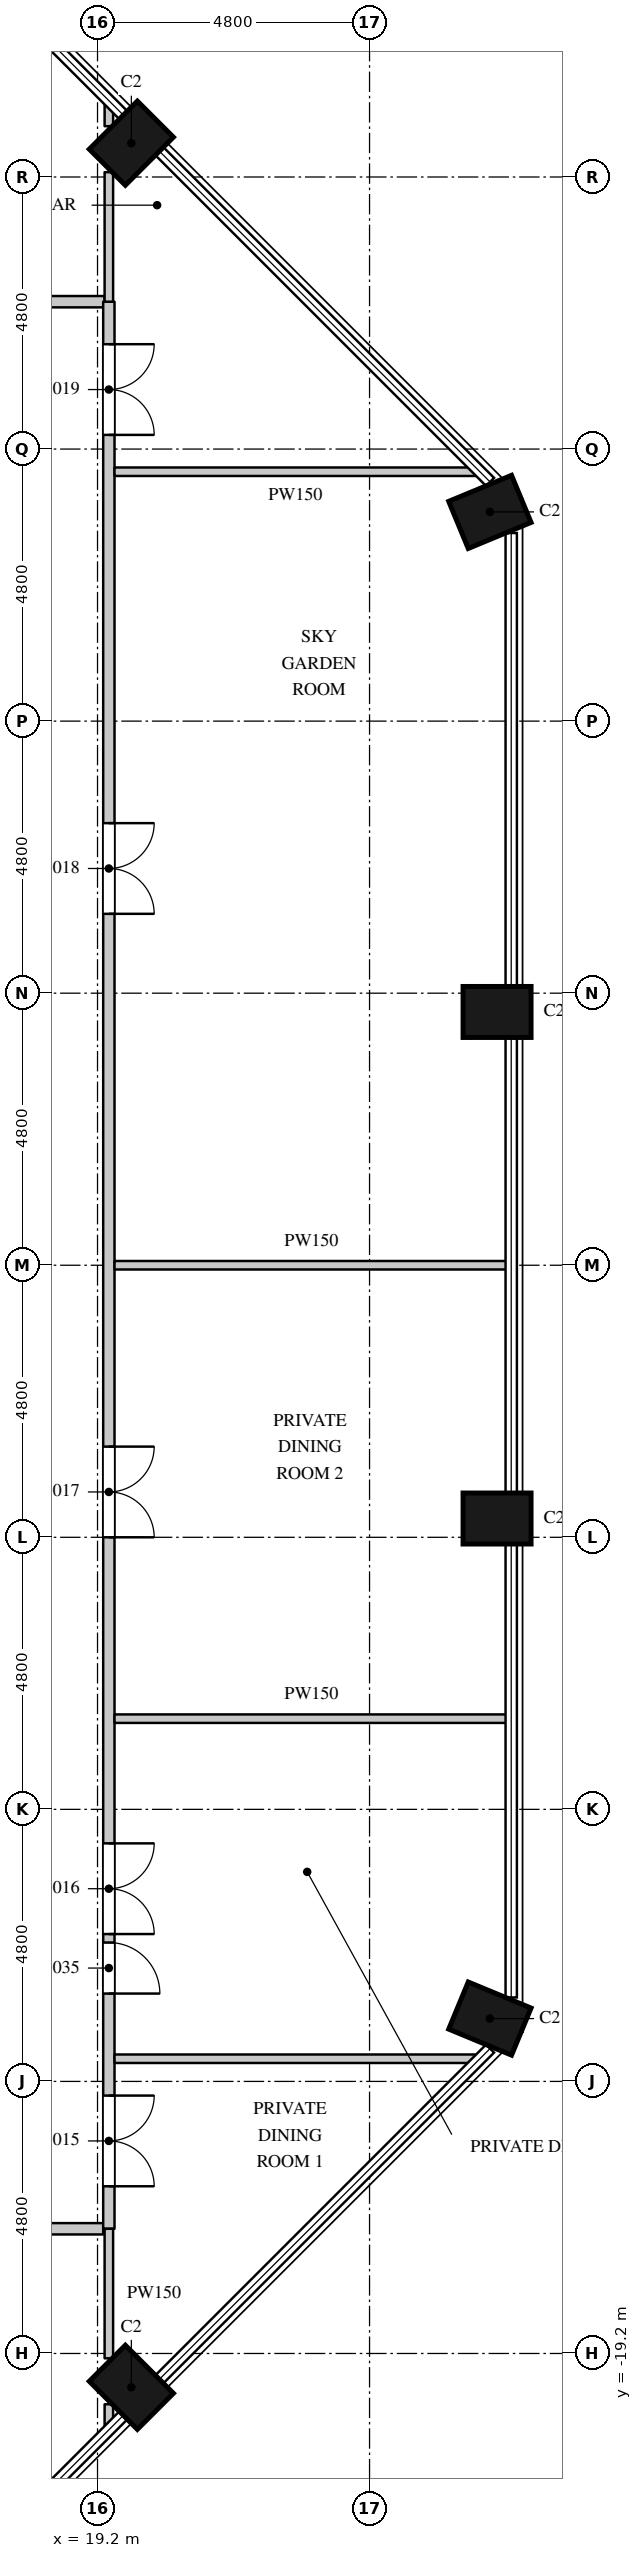
"""IFC4 building model, lengths in metres.
Left out: names, types, materials, properties, quantities, classifications, styles, units other than length and angle.
Written with IfcOpenShell. Run it as: python <this file> out.ifc"""

import sys

from ifc_helpers import new_model, si_unit, direction, frame, frame_2d, origin, origin_2d, place, context, subcontext, project, spatial, rectangle, extrude, element, fill, save


model = new_model("IFC4")
c1 = context("Model", 3, precision=1e-05, world=origin(), true_north=direction((0.0, 1.0)))
c2 = subcontext(c1, "Body", "Model", "MODEL_VIEW")
j1 = project(units=[si_unit("LENGTHUNIT", "METRE"), si_unit("PLANEANGLEUNIT", "RADIAN")], contexts=[c1])
p1 = place(None, origin())
s1 = spatial("IfcSite", under=j1, at=p1, CompositionType="ELEMENT")
p2 = place(p1, origin())
s2 = spatial("IfcBuilding", under=s1, at=p2, CompositionType="ELEMENT")
p3 = place(p2, frame((0.0, 0.0, 156.9)))
s3 = spatial("IfcBuildingStorey", under=s2, at=p3, CompositionType="ELEMENT", Elevation=156.9)
for number, where, z_axis, x_axis in (
    (1, (26.124, -13.291, 0.0), (0.0, 0.0, 1.0), (0.383, 0.924, 0.0)),
    (2, (26.25, -4.469, 0.0), (0.0, 0.0, 1.0), (0.0, 1.0, 0.0)),
    (3, (26.25, 4.469, 0.0), (0.0, 0.0, 1.0), (0.0, 1.0, 0.0)),
    (4, (26.124, 13.291, 0.0), (0.0, 0.0, 1.0), (-0.383, 0.924, 0.0)),
    (5, (19.797, 19.797, 0.0), (0.0, 0.0, 1.0), (-0.707, 0.707, 0.0)),
    (6, (19.797, -19.797, 0.0), (0.0, 0.0, 1.0), (0.707, 0.707, 0.0)),
):
    element("IfcColumn", number, at=place(p3, frame(where, z_axis=z_axis, x_axis=x_axis)), inside=s3, PredefinedType="COLUMN", context=c2, shape_type="SweptSolid", body=[
        extrude(rectangle(XDim=0.9, YDim=1.2, at=origin_2d()), origin(), (0.0, 0.0, 1.0), 5.4),
    ])
p4 = place(p3, frame((-19.3, -17.0, 0.0), z_axis=(0.0, 0.0, 1.0), x_axis=(1.0, 0.0, 0.0)))
e7 = element("IfcWall", 7, at=p4, inside=s3, PredefinedType="PARTITIONING", context=c2, shape_type="SweptSolid", body=[
    extrude(rectangle(XDim=38.6, YDim=0.2, at=frame_2d((19.3, 0.0))), origin(), (0.0, 0.0, 1.0), 5.1),
])
p5 = place(p4, frame((3.25, 0.0, 0.0)))
e8 = element("IfcOpeningElement", 8, at=p5, cuts=e7, PredefinedType="OPENING", context=c2, shape_type="SweptSolid", body=[
    extrude(rectangle(XDim=0.9, YDim=2.2, at=frame_2d((0.45, 1.1))), frame((0.0, 0.11, 0.0), z_axis=(0.0, -1.0, 0.0), x_axis=(1.0, 0.0, 0.0)), (0.0, 0.0, 1.0), 0.22),
])
p6 = place(p4, frame((9.8, 0.0, 0.0)))
e9 = element("IfcOpeningElement", 9, at=p6, cuts=e7, PredefinedType="OPENING", context=c2, shape_type="SweptSolid", body=[
    extrude(rectangle(XDim=0.9, YDim=2.2, at=frame_2d((0.45, 1.1))), frame((0.0, 0.11, 0.0), z_axis=(0.0, -1.0, 0.0), x_axis=(1.0, 0.0, 0.0)), (0.0, 0.0, 1.0), 0.22),
])
p7 = place(p4, frame((14.2, 0.0, 0.0)))
e10 = element("IfcOpeningElement", 10, at=p7, cuts=e7, PredefinedType="OPENING", context=c2, shape_type="SweptSolid", body=[
    extrude(rectangle(XDim=0.9, YDim=2.2, at=frame_2d((0.45, 1.1))), frame((0.0, 0.11, 0.0), z_axis=(0.0, -1.0, 0.0), x_axis=(1.0, 0.0, 0.0)), (0.0, 0.0, 1.0), 0.22),
])
p8 = place(p4, frame((18.9, 0.0, 0.0)))
e11 = element("IfcOpeningElement", 11, at=p8, cuts=e7, PredefinedType="OPENING", context=c2, shape_type="SweptSolid", body=[
    extrude(rectangle(XDim=1.6, YDim=2.4, at=frame_2d((0.8, 1.2))), frame((0.0, 0.11, 0.0), z_axis=(0.0, -1.0, 0.0), x_axis=(1.0, 0.0, 0.0)), (0.0, 0.0, 1.0), 0.22),
])
p9 = place(p4, frame((26.0, 0.0, 0.0)))
e12 = element("IfcOpeningElement", 12, at=p9, cuts=e7, PredefinedType="OPENING", context=c2, shape_type="SweptSolid", body=[
    extrude(rectangle(XDim=1.6, YDim=2.4, at=frame_2d((0.8, 1.2))), frame((0.0, 0.11, 0.0), z_axis=(0.0, -1.0, 0.0), x_axis=(1.0, 0.0, 0.0)), (0.0, 0.0, 1.0), 0.22),
])
p10 = place(p4, frame((33.6, 0.0, 0.0)))
e13 = element("IfcOpeningElement", 13, at=p10, cuts=e7, PredefinedType="OPENING", context=c2, shape_type="SweptSolid", body=[
    extrude(rectangle(XDim=1.6, YDim=2.4, at=frame_2d((0.8, 1.2))), frame((0.0, 0.11, 0.0), z_axis=(0.0, -1.0, 0.0), x_axis=(1.0, 0.0, 0.0)), (0.0, 0.0, 1.0), 0.22),
])
p11 = place(p4, frame((24.95, 0.0, 0.0)))
e14 = element("IfcOpeningElement", 14, at=p11, cuts=e7, PredefinedType="OPENING", context=c2, shape_type="SweptSolid", body=[
    extrude(rectangle(XDim=0.9, YDim=2.2, at=frame_2d((0.45, 1.1))), frame((0.0, 0.11, 0.0), z_axis=(0.0, -1.0, 0.0), x_axis=(1.0, 0.0, 0.0)), (0.0, 0.0, 1.0), 0.22),
])
p12 = place(p3, frame((-19.3, 17.0, 0.0), z_axis=(0.0, 0.0, 1.0), x_axis=(1.0, 0.0, 0.0)))
e15 = element("IfcWall", 15, at=p12, inside=s3, PredefinedType="PARTITIONING", context=c2, shape_type="SweptSolid", body=[
    extrude(rectangle(XDim=38.625, YDim=0.2, at=frame_2d((19.312, 0.0))), origin(), (0.0, 0.0, 1.0), 5.1),
])
p13 = place(p12, frame((4.9, 0.0, 0.0)))
e16 = element("IfcOpeningElement", 16, at=p13, cuts=e15, PredefinedType="OPENING", context=c2, shape_type="SweptSolid", body=[
    extrude(rectangle(XDim=1.6, YDim=2.4, at=frame_2d((0.8, 1.2))), frame((0.0, 0.11, 0.0), z_axis=(0.0, -1.0, 0.0), x_axis=(1.0, 0.0, 0.0)), (0.0, 0.0, 1.0), 0.22),
])
p14 = place(p12, frame((34.1, 0.0, 0.0)))
e17 = element("IfcOpeningElement", 17, at=p14, cuts=e15, PredefinedType="OPENING", context=c2, shape_type="SweptSolid", body=[
    extrude(rectangle(XDim=1.6, YDim=2.4, at=frame_2d((0.8, 1.2))), frame((0.0, 0.11, 0.0), z_axis=(0.0, -1.0, 0.0), x_axis=(1.0, 0.0, 0.0)), (0.0, 0.0, 1.0), 0.22),
])
p15 = place(p12, frame((20.5, 0.0, 0.0)))
e18 = element("IfcOpeningElement", 18, at=p15, cuts=e15, PredefinedType="OPENING", context=c2, shape_type="SweptSolid", body=[
    extrude(rectangle(XDim=1.6, YDim=2.4, at=frame_2d((0.8, 1.2))), frame((0.0, 0.11, 0.0), z_axis=(0.0, -1.0, 0.0), x_axis=(1.0, 0.0, 0.0)), (0.0, 0.0, 1.0), 0.22),
])
p16 = place(p12, frame((32.35, 0.0, 0.0)))
e19 = element("IfcOpeningElement", 19, at=p16, cuts=e15, PredefinedType="OPENING", context=c2, shape_type="SweptSolid", body=[
    extrude(rectangle(XDim=1.6, YDim=2.4, at=frame_2d((0.8, 1.2))), frame((0.0, 0.11, 0.0), z_axis=(0.0, -1.0, 0.0), x_axis=(1.0, 0.0, 0.0)), (0.0, 0.0, 1.0), 0.22),
])
p17 = place(p3, frame((19.4, -17.0, 0.0), z_axis=(0.0, 0.0, 1.0), x_axis=(0.0, 1.0, 0.0)))
e20 = element("IfcWall", 20, at=p17, inside=s3, PredefinedType="PARTITIONING", context=c2, shape_type="SweptSolid", body=[
    extrude(rectangle(XDim=34.0, YDim=0.2, at=frame_2d((17.0, 0.0))), origin(), (0.0, 0.0, 1.0), 5.1),
])
p18 = place(p17, frame((0.75, 0.0, 0.0)))
e21 = element("IfcOpeningElement", 21, at=p18, cuts=e20, PredefinedType="OPENING", context=c2, shape_type="SweptSolid", body=[
    extrude(rectangle(XDim=1.6, YDim=2.4, at=frame_2d((0.8, 1.2))), frame((0.0, 0.11, 0.0), z_axis=(0.0, -1.0, 0.0), x_axis=(1.0, 0.0, 0.0)), (0.0, 0.0, 1.0), 0.22),
])
p19 = place(p17, frame((5.2, 0.0, 0.0)))
e22 = element("IfcOpeningElement", 22, at=p19, cuts=e20, PredefinedType="OPENING", context=c2, shape_type="SweptSolid", body=[
    extrude(rectangle(XDim=1.6, YDim=2.4, at=frame_2d((0.8, 1.2))), frame((0.0, 0.11, 0.0), z_axis=(0.0, -1.0, 0.0), x_axis=(1.0, 0.0, 0.0)), (0.0, 0.0, 1.0), 0.22),
])
p20 = place(p17, frame((12.2, 0.0, 0.0)))
e23 = element("IfcOpeningElement", 23, at=p20, cuts=e20, PredefinedType="OPENING", context=c2, shape_type="SweptSolid", body=[
    extrude(rectangle(XDim=1.6, YDim=2.4, at=frame_2d((0.8, 1.2))), frame((0.0, 0.11, 0.0), z_axis=(0.0, -1.0, 0.0), x_axis=(1.0, 0.0, 0.0)), (0.0, 0.0, 1.0), 0.22),
])
p21 = place(p17, frame((23.2, 0.0, 0.0)))
e24 = element("IfcOpeningElement", 24, at=p21, cuts=e20, PredefinedType="OPENING", context=c2, shape_type="SweptSolid", body=[
    extrude(rectangle(XDim=1.6, YDim=2.4, at=frame_2d((0.8, 1.2))), frame((0.0, 0.11, 0.0), z_axis=(0.0, -1.0, 0.0), x_axis=(1.0, 0.0, 0.0)), (0.0, 0.0, 1.0), 0.22),
])
p22 = place(p17, frame((31.65, 0.0, 0.0)))
e25 = element("IfcOpeningElement", 25, at=p22, cuts=e20, PredefinedType="OPENING", context=c2, shape_type="SweptSolid", body=[
    extrude(rectangle(XDim=1.6, YDim=2.4, at=frame_2d((0.8, 1.2))), frame((0.0, 0.11, 0.0), z_axis=(0.0, -1.0, 0.0), x_axis=(1.0, 0.0, 0.0)), (0.0, 0.0, 1.0), 0.22),
])
p23 = place(p17, frame((4.15, 0.0, 0.0)))
e26 = element("IfcOpeningElement", 26, at=p23, cuts=e20, PredefinedType="OPENING", context=c2, shape_type="SweptSolid", body=[
    extrude(rectangle(XDim=0.9, YDim=2.2, at=frame_2d((0.45, 1.1))), frame((0.0, 0.11, 0.0), z_axis=(0.0, -1.0, 0.0), x_axis=(1.0, 0.0, 0.0)), (0.0, 0.0, 1.0), 0.22),
])
p24 = place(p3, frame((19.4, -20.484, 0.0), z_axis=(0.0, 0.0, 1.0), x_axis=(0.0, 1.0, 0.0)))
e27 = element("IfcWall", 27, at=p24, inside=s3, PredefinedType="PARTITIONING", context=c2, shape_type="SweptSolid", body=[
    extrude(rectangle(XDim=0.387, YDim=0.15, at=frame_2d((0.194, 0.0))), origin(), (0.0, 0.0, 1.0), 5.1),
])
p25 = place(p3, frame((19.4, -19.285, 0.0), z_axis=(0.0, 0.0, 1.0), x_axis=(0.0, 1.0, 0.0)))
e28 = element("IfcWall", 28, at=p25, inside=s3, PredefinedType="PARTITIONING", context=c2, shape_type="SweptSolid", body=[
    extrude(rectangle(XDim=2.285, YDim=0.15, at=frame_2d((1.143, 0.0))), origin(), (0.0, 0.0, 1.0), 5.1),
])
p26 = place(p3, frame((19.5, -14.0, 0.0), z_axis=(0.0, 0.0, 1.0), x_axis=(1.0, 0.0, 0.0)))
e29 = element("IfcWall", 29, at=p26, inside=s3, PredefinedType="PARTITIONING", context=c2, shape_type="SweptSolid", body=[
    extrude(rectangle(XDim=6.384, YDim=0.15, at=frame_2d((3.192, 0.0))), origin(), (0.0, 0.0, 1.0), 5.1),
])
for number, where, z_axis, x_axis in (
    (30, (19.5, -8.0, 0.0), (0.0, 0.0, 1.0), (1.0, 0.0, 0.0)),
    (31, (19.5, 0.0, 0.0), (0.0, 0.0, 1.0), (1.0, 0.0, 0.0)),
):
    element("IfcWall", number, at=place(p3, frame(where, z_axis=z_axis, x_axis=x_axis)), inside=s3, PredefinedType="PARTITIONING", context=c2, shape_type="SweptSolid", body=[
        extrude(rectangle(XDim=6.955, YDim=0.15, at=frame_2d((3.478, 0.0))), origin(), (0.0, 0.0, 1.0), 5.1),
    ])
p27 = place(p3, frame((19.5, 14.0, 0.0), z_axis=(0.0, 0.0, 1.0), x_axis=(1.0, 0.0, 0.0)))
e32 = element("IfcWall", 32, at=p27, inside=s3, PredefinedType="PARTITIONING", context=c2, shape_type="SweptSolid", body=[
    extrude(rectangle(XDim=6.384, YDim=0.15, at=frame_2d((3.192, 0.0))), origin(), (0.0, 0.0, 1.0), 5.1),
])
p28 = place(p3, frame((19.4, 17.0, 0.0), z_axis=(0.0, 0.0, 1.0), x_axis=(0.0, 1.0, 0.0)))
e33 = element("IfcWall", 33, at=p28, inside=s3, PredefinedType="PARTITIONING", context=c2, shape_type="SweptSolid", body=[
    extrude(rectangle(XDim=2.285, YDim=0.15, at=frame_2d((1.143, 0.0))), origin(), (0.0, 0.0, 1.0), 5.1),
])
p29 = place(p3, frame((19.4, 20.096, 0.0), z_axis=(0.0, 0.0, 1.0), x_axis=(0.0, 1.0, 0.0)))
e34 = element("IfcWall", 34, at=p29, inside=s3, PredefinedType="PARTITIONING", context=c2, shape_type="SweptSolid", body=[
    extrude(rectangle(XDim=0.387, YDim=0.15, at=frame_2d((0.194, 0.0))), origin(), (0.0, 0.0, 1.0), 5.1),
])
p30 = place(p18, origin())
e35 = element("IfcDoor", 35, at=p30, inside=s3, OperationType="DOUBLE_DOOR_SINGLE_SWING", PredefinedType="DOOR", context=c2, shape_type="SweptSolid", body=[
    extrude(rectangle(XDim=1.6, YDim=2.4, at=frame_2d((0.8, 1.2))), frame((0.0, 0.025, 0.0), z_axis=(0.0, -1.0, 0.0), x_axis=(1.0, 0.0, 0.0)), (0.0, 0.0, 1.0), 0.05),
])
fill(e21, e35)
p31 = place(p19, origin())
e36 = element("IfcDoor", 36, at=p31, inside=s3, OperationType="DOUBLE_DOOR_SINGLE_SWING", PredefinedType="DOOR", context=c2, shape_type="SweptSolid", body=[
    extrude(rectangle(XDim=1.6, YDim=2.4, at=frame_2d((0.8, 1.2))), frame((0.0, 0.025, 0.0), z_axis=(0.0, -1.0, 0.0), x_axis=(1.0, 0.0, 0.0)), (0.0, 0.0, 1.0), 0.05),
])
fill(e22, e36)
p32 = place(p20, origin())
e37 = element("IfcDoor", 37, at=p32, inside=s3, OperationType="DOUBLE_DOOR_SINGLE_SWING", PredefinedType="DOOR", context=c2, shape_type="SweptSolid", body=[
    extrude(rectangle(XDim=1.6, YDim=2.4, at=frame_2d((0.8, 1.2))), frame((0.0, 0.025, 0.0), z_axis=(0.0, -1.0, 0.0), x_axis=(1.0, 0.0, 0.0)), (0.0, 0.0, 1.0), 0.05),
])
fill(e23, e37)
p33 = place(p21, origin())
e38 = element("IfcDoor", 38, at=p33, inside=s3, OperationType="DOUBLE_DOOR_SINGLE_SWING", PredefinedType="DOOR", context=c2, shape_type="SweptSolid", body=[
    extrude(rectangle(XDim=1.6, YDim=2.4, at=frame_2d((0.8, 1.2))), frame((0.0, 0.025, 0.0), z_axis=(0.0, -1.0, 0.0), x_axis=(1.0, 0.0, 0.0)), (0.0, 0.0, 1.0), 0.05),
])
fill(e24, e38)
p34 = place(p22, origin())
e39 = element("IfcDoor", 39, at=p34, inside=s3, OperationType="DOUBLE_DOOR_SINGLE_SWING", PredefinedType="DOOR", context=c2, shape_type="SweptSolid", body=[
    extrude(rectangle(XDim=1.6, YDim=2.4, at=frame_2d((0.8, 1.2))), frame((0.0, 0.025, 0.0), z_axis=(0.0, -1.0, 0.0), x_axis=(1.0, 0.0, 0.0)), (0.0, 0.0, 1.0), 0.05),
])
fill(e25, e39)
p35 = place(p23, origin())
e40 = element("IfcDoor", 40, at=p35, inside=s3, OperationType="SINGLE_SWING_RIGHT", PredefinedType="DOOR", context=c2, shape_type="SweptSolid", body=[
    extrude(rectangle(XDim=0.9, YDim=2.2, at=frame_2d((0.45, 1.1))), frame((0.0, 0.025, 0.0), z_axis=(0.0, -1.0, 0.0), x_axis=(1.0, 0.0, 0.0)), (0.0, 0.0, 1.0), 0.05),
])
fill(e26, e40)
save(model, sys.argv[1])
